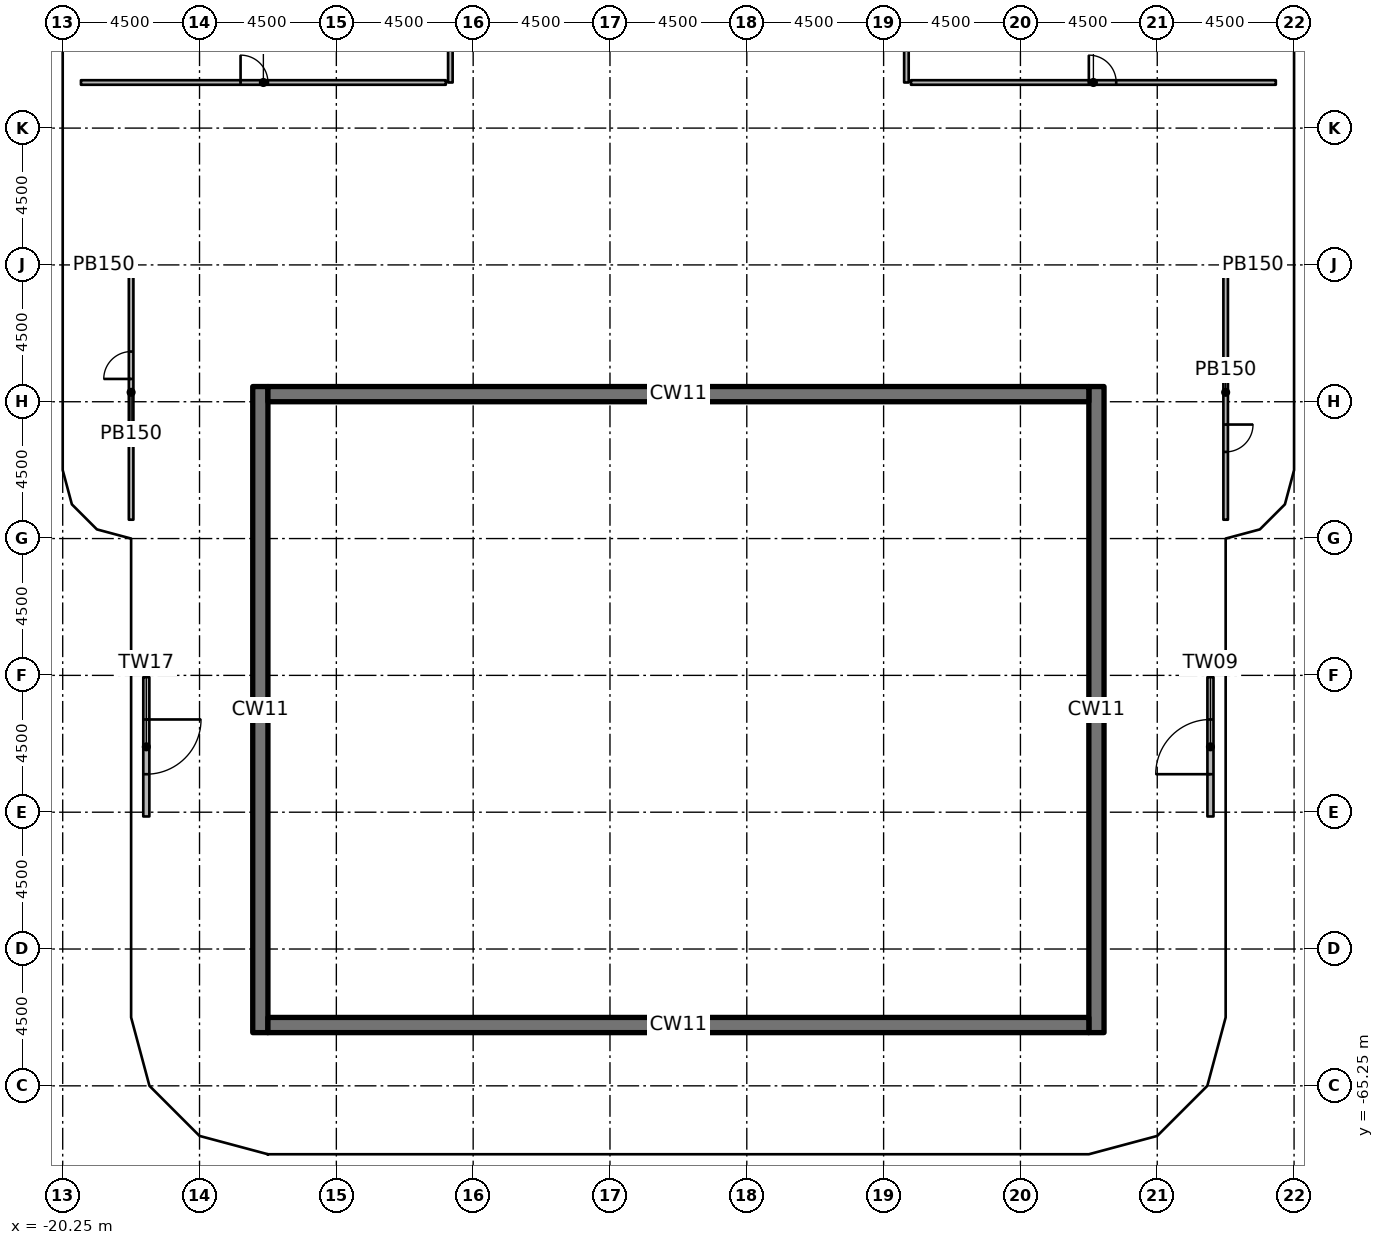
"""IFC4 building model, lengths in metres.
Left out: names, types, materials, properties, quantities, classifications, styles, units other than length and angle.
Written with IfcOpenShell. Run it as: python <this file> out.ifc"""

import sys

from ifc_helpers import new_model, si_unit, direction, frame, frame_2d, origin, origin_2d, place, context, subcontext, project, spatial, rectangle, extrude, element, fill, save


model = new_model("IFC4")
c1 = context("Model", 3, precision=1e-05, world=origin(), true_north=direction((0.0, 1.0)))
c2 = subcontext(c1, "Body", "Model", "MODEL_VIEW")
j1 = project(units=[si_unit("LENGTHUNIT", "METRE"), si_unit("PLANEANGLEUNIT", "RADIAN")], contexts=[c1])
p1 = place(None, origin())
s1 = spatial("IfcSite", under=j1, at=p1, CompositionType="ELEMENT")
p2 = place(p1, origin())
s2 = spatial("IfcBuilding", under=s1, at=p2, CompositionType="ELEMENT")
p3 = place(p2, frame((0.0, 0.0, 12.0)))
s3 = spatial("IfcBuildingStorey", under=s2, at=p3, CompositionType="ELEMENT", Elevation=12.0)
for number, where, z_axis, x_axis in (
    (1, (-19.65, -42.75, 0.0), (0.0, 0.0, 1.0), (1.0, 0.0, 0.0)),
    (2, (-15.75, -60.75, 0.0), (0.0, 0.0, 1.0), (1.0, 0.0, 0.0)),
    (3, (-15.75, -56.25, 0.0), (0.0, 0.0, 1.0), (1.0, 0.0, 0.0)),
    (4, (-15.75, -51.75, 0.0), (0.0, 0.0, 1.0), (1.0, 0.0, 0.0)),
    (5, (-15.75, -47.25, 0.0), (0.0, 0.0, 1.0), (1.0, 0.0, 0.0)),
    (6, (-15.75, -42.75, 0.0), (0.0, 0.0, 1.0), (1.0, 0.0, 0.0)),
    (7, (-15.367, -39.68, 0.0), (0.0, 0.0, 1.0), (1.0, 0.0, 0.0)),
    (8, (-15.15, -33.75, 0.0), (0.0, 0.0, 1.0), (1.0, 0.0, 0.0)),
    (9, (-11.25, -65.25, 0.0), (0.0, 0.0, 1.0), (1.0, 0.0, 0.0)),
    (10, (-10.65, -38.85, 0.0), (0.0, 0.0, 1.0), (1.0, 0.0, 0.0)),
    (11, (-6.75, -65.25, 0.0), (0.0, 0.0, 1.0), (1.0, 0.0, 0.0)),
    (12, (-2.25, -65.25, 0.0), (0.0, 0.0, 1.0), (1.0, 0.0, 0.0)),
    (13, (-2.25, -33.11, 0.0), (0.0, 0.0, 1.0), (1.0, 0.0, 0.0)),
    (14, (2.25, -65.25, 0.0), (0.0, 0.0, 1.0), (1.0, 0.0, 0.0)),
    (15, (2.25, -33.11, 0.0), (0.0, 0.0, 1.0), (1.0, 0.0, 0.0)),
    (16, (6.75, -65.25, 0.0), (0.0, 0.0, 1.0), (1.0, 0.0, 0.0)),
    (17, (11.25, -65.25, 0.0), (0.0, 0.0, 1.0), (1.0, 0.0, 0.0)),
    (18, (10.65, -38.85, 0.0), (0.0, 0.0, 1.0), (1.0, 0.0, 0.0)),
    (19, (10.65, -33.75, 0.0), (0.0, 0.0, 1.0), (1.0, 0.0, 0.0)),
    (20, (15.75, -60.75, 0.0), (0.0, 0.0, 1.0), (1.0, 0.0, 0.0)),
    (21, (15.75, -56.25, 0.0), (0.0, 0.0, 1.0), (1.0, 0.0, 0.0)),
    (22, (15.75, -51.75, 0.0), (0.0, 0.0, 1.0), (1.0, 0.0, 0.0)),
    (23, (15.75, -47.25, 0.0), (0.0, 0.0, 1.0), (1.0, 0.0, 0.0)),
    (24, (15.75, -42.75, 0.0), (0.0, 0.0, 1.0), (1.0, 0.0, 0.0)),
    (25, (15.367, -39.68, 0.0), (0.0, 0.0, 1.0), (1.0, 0.0, 0.0)),
    (26, (19.65, -42.75, 0.0), (0.0, 0.0, 1.0), (1.0, 0.0, 0.0)),
):
    element("IfcColumn", number, at=place(p3, frame(where, z_axis=z_axis, x_axis=x_axis)), inside=s3, PredefinedType="COLUMN", context=c2, shape_type="SweptSolid", body=[
        extrude(rectangle(XDim=1.2, YDim=1.2, at=origin_2d()), origin(), (0.0, 0.0, 1.0), 4.55),
    ])
for number, where, z_axis, x_axis in (
    (27, (-13.75, -63.5, 0.0), (0.0, 0.0, 1.0), (0.0, 1.0, 0.0)),
    (28, (13.75, -63.5, 0.0), (0.0, 0.0, 1.0), (0.0, 1.0, 0.0)),
):
    element("IfcWall", number, at=place(p3, frame(where, z_axis=z_axis, x_axis=x_axis)), inside=s3, PredefinedType="SOLIDWALL", context=c2, shape_type="SweptSolid", body=[
        extrude(rectangle(XDim=21.25, YDim=0.5, at=frame_2d((10.625, 0.0))), origin(), (0.0, 0.0, 1.0), 5.0),
    ])
for number, where, z_axis, x_axis in (
    (29, (-13.5, -63.25, 0.0), (0.0, 0.0, 1.0), (1.0, 0.0, 0.0)),
    (30, (-13.5, -42.5, 0.0), (0.0, 0.0, 1.0), (1.0, 0.0, 0.0)),
):
    element("IfcWall", number, at=place(p3, frame(where, z_axis=z_axis, x_axis=x_axis)), inside=s3, PredefinedType="SOLIDWALL", context=c2, shape_type="SweptSolid", body=[
        extrude(rectangle(XDim=27.0, YDim=0.5, at=frame_2d((13.5, 0.0))), origin(), (0.0, 0.0, 1.0), 5.0),
    ])
p4 = place(p3, frame((17.5, -56.39, 0.0), z_axis=(0.0, 0.0, 1.0), x_axis=(0.0, 1.0, 0.0)))
e31 = element("IfcWall", 31, at=p4, inside=s3, PredefinedType="SOLIDWALL", context=c2, shape_type="SweptSolid", body=[
    extrude(rectangle(XDim=4.58, YDim=0.2, at=frame_2d((2.29, 0.0))), origin(), (0.0, 0.0, 1.0), 4.55),
])
p5 = place(p4, frame((1.39, 0.0, 0.0)))
e32 = element("IfcOpeningElement", 32, at=p5, cuts=e31, PredefinedType="OPENING", context=c2, shape_type="SweptSolid", body=[
    extrude(rectangle(XDim=1.8, YDim=2.4, at=frame_2d((0.9, 1.2))), frame((0.0, 0.11, 0.0), z_axis=(0.0, -1.0, 0.0), x_axis=(1.0, 0.0, 0.0)), (0.0, 0.0, 1.0), 0.22),
])
p6 = place(p3, frame((-17.5, -51.81, 0.0), z_axis=(0.0, 0.0, 1.0), x_axis=(0.0, -1.0, 0.0)))
e33 = element("IfcWall", 33, at=p6, inside=s3, PredefinedType="SOLIDWALL", context=c2, shape_type="SweptSolid", body=[
    extrude(rectangle(XDim=4.58, YDim=0.2, at=frame_2d((2.29, 0.0))), origin(), (0.0, 0.0, 1.0), 4.55),
])
p7 = place(p6, frame((1.39, 0.0, 0.0)))
e34 = element("IfcOpeningElement", 34, at=p7, cuts=e33, PredefinedType="OPENING", context=c2, shape_type="SweptSolid", body=[
    extrude(rectangle(XDim=1.8, YDim=2.4, at=frame_2d((0.9, 1.2))), frame((0.0, 0.11, 0.0), z_axis=(0.0, -1.0, 0.0), x_axis=(1.0, 0.0, 0.0)), (0.0, 0.0, 1.0), 0.22),
])
p8 = place(p3, frame((-18.0, -46.63, 0.0), z_axis=(0.0, 0.0, 1.0), x_axis=(0.0, 1.0, 0.0)))
e35 = element("IfcWall", 35, at=p8, inside=s3, PredefinedType="PARTITIONING", context=c2, shape_type="SweptSolid", body=[
    extrude(rectangle(XDim=8.38, YDim=0.15, at=frame_2d((4.19, 0.0))), origin(), (0.0, 0.0, 1.0), 4.55),
])
p9 = place(p8, frame((4.63, 0.0, 0.0)))
e36 = element("IfcOpeningElement", 36, at=p9, cuts=e35, PredefinedType="OPENING", context=c2, shape_type="SweptSolid", body=[
    extrude(rectangle(XDim=0.9, YDim=2.1, at=frame_2d((0.45, 1.05))), frame((0.0, 0.085, 0.0), z_axis=(0.0, -1.0, 0.0), x_axis=(1.0, 0.0, 0.0)), (0.0, 0.0, 1.0), 0.17),
])
p10 = place(p3, frame((18.0, -38.25, 0.0), z_axis=(0.0, 0.0, 1.0), x_axis=(0.0, -1.0, 0.0)))
e37 = element("IfcWall", 37, at=p10, inside=s3, PredefinedType="PARTITIONING", context=c2, shape_type="SweptSolid", body=[
    extrude(rectangle(XDim=8.38, YDim=0.15, at=frame_2d((4.19, 0.0))), origin(), (0.0, 0.0, 1.0), 4.55),
])
p11 = place(p10, frame((5.25, 0.0, 0.0)))
e38 = element("IfcOpeningElement", 38, at=p11, cuts=e37, PredefinedType="OPENING", context=c2, shape_type="SweptSolid", body=[
    extrude(rectangle(XDim=0.9, YDim=2.1, at=frame_2d((0.45, 1.05))), frame((0.0, 0.085, 0.0), z_axis=(0.0, -1.0, 0.0), x_axis=(1.0, 0.0, 0.0)), (0.0, 0.0, 1.0), 0.17),
])
for number, where, z_axis, x_axis in (
    (39, (-19.65, -38.25, 0.0), (0.0, 0.0, 1.0), (1.0, 0.0, 0.0)),
    (40, (18.15, -38.25, 0.0), (0.0, 0.0, 1.0), (1.0, 0.0, 0.0)),
):
    element("IfcWall", number, at=place(p3, frame(where, z_axis=z_axis, x_axis=x_axis)), inside=s3, PredefinedType="PARTITIONING", context=c2, shape_type="SweptSolid", body=[
        extrude(rectangle(XDim=1.5, YDim=0.15, at=frame_2d((0.75, 0.0))), origin(), (0.0, 0.0, 1.0), 4.55),
    ])
for number, where, z_axis, x_axis in (
    (41, (7.5, -24.75, 0.0), (0.0, 0.0, 1.0), (0.0, -1.0, 0.0)),
    (42, (-7.5, -32.25, 0.0), (0.0, 0.0, 1.0), (0.0, 1.0, 0.0)),
):
    element("IfcWall", number, at=place(p3, frame(where, z_axis=z_axis, x_axis=x_axis)), inside=s3, PredefinedType="PARTITIONING", context=c2, shape_type="SweptSolid", body=[
        extrude(rectangle(XDim=7.5, YDim=0.15, at=frame_2d((3.75, 0.0))), origin(), (0.0, 0.0, 1.0), 4.55),
    ])
p12 = place(p3, frame((7.65, -32.25, 0.0), z_axis=(0.0, 0.0, 1.0), x_axis=(1.0, 0.0, 0.0)))
e43 = element("IfcWall", 43, at=p12, inside=s3, PredefinedType="PARTITIONING", context=c2, shape_type="SweptSolid", body=[
    extrude(rectangle(XDim=12.0, YDim=0.15, at=frame_2d((6.0, 0.0))), origin(), (0.0, 0.0, 1.0), 4.55),
])
p13 = place(p12, frame((5.85, 0.0, 0.0)))
e44 = element("IfcOpeningElement", 44, at=p13, cuts=e43, PredefinedType="OPENING", context=c2, shape_type="SweptSolid", body=[
    extrude(rectangle(XDim=0.9, YDim=2.1, at=frame_2d((0.45, 1.05))), frame((0.0, 0.085, 0.0), z_axis=(0.0, -1.0, 0.0), x_axis=(1.0, 0.0, 0.0)), (0.0, 0.0, 1.0), 0.17),
])
p14 = place(p3, frame((-19.65, -32.25, 0.0), z_axis=(0.0, 0.0, 1.0), x_axis=(1.0, 0.0, 0.0)))
e45 = element("IfcWall", 45, at=p14, inside=s3, PredefinedType="PARTITIONING", context=c2, shape_type="SweptSolid", body=[
    extrude(rectangle(XDim=12.0, YDim=0.15, at=frame_2d((6.0, 0.0))), origin(), (0.0, 0.0, 1.0), 4.55),
])
p15 = place(p14, frame((5.25, 0.0, 0.0)))
e46 = element("IfcOpeningElement", 46, at=p15, cuts=e45, PredefinedType="OPENING", context=c2, shape_type="SweptSolid", body=[
    extrude(rectangle(XDim=0.9, YDim=2.1, at=frame_2d((0.45, 1.05))), frame((0.0, 0.085, 0.0), z_axis=(0.0, -1.0, 0.0), x_axis=(1.0, 0.0, 0.0)), (0.0, 0.0, 1.0), 0.17),
])
p16 = place(p5, origin())
e47 = element("IfcDoor", 47, at=p16, inside=s3, OperationType="SINGLE_SWING_LEFT", PredefinedType="DOOR", context=c2, shape_type="SweptSolid", body=[
    extrude(rectangle(XDim=1.8, YDim=2.4, at=frame_2d((0.9, 1.2))), frame((0.0, 0.025, 0.0), z_axis=(0.0, -1.0, 0.0), x_axis=(1.0, 0.0, 0.0)), (0.0, 0.0, 1.0), 0.05),
])
fill(e32, e47)
p17 = place(p7, origin())
e48 = element("IfcDoor", 48, at=p17, inside=s3, OperationType="SINGLE_SWING_LEFT", PredefinedType="DOOR", context=c2, shape_type="SweptSolid", body=[
    extrude(rectangle(XDim=1.8, YDim=2.4, at=frame_2d((0.9, 1.2))), frame((0.0, 0.025, 0.0), z_axis=(0.0, -1.0, 0.0), x_axis=(1.0, 0.0, 0.0)), (0.0, 0.0, 1.0), 0.05),
])
fill(e34, e48)
p18 = place(p9, origin())
e49 = element("IfcDoor", 49, at=p18, inside=s3, OperationType="SINGLE_SWING_LEFT", PredefinedType="DOOR", context=c2, shape_type="SweptSolid", body=[
    extrude(rectangle(XDim=0.9, YDim=2.1, at=frame_2d((0.45, 1.05))), frame((0.0, 0.025, 0.0), z_axis=(0.0, -1.0, 0.0), x_axis=(1.0, 0.0, 0.0)), (0.0, 0.0, 1.0), 0.05),
])
fill(e36, e49)
p19 = place(p11, origin())
e50 = element("IfcDoor", 50, at=p19, inside=s3, OperationType="SINGLE_SWING_LEFT", PredefinedType="DOOR", context=c2, shape_type="SweptSolid", body=[
    extrude(rectangle(XDim=0.9, YDim=2.1, at=frame_2d((0.45, 1.05))), frame((0.0, 0.025, 0.0), z_axis=(0.0, -1.0, 0.0), x_axis=(1.0, 0.0, 0.0)), (0.0, 0.0, 1.0), 0.05),
])
fill(e38, e50)
p20 = place(p13, origin())
e51 = element("IfcDoor", 51, at=p20, inside=s3, OperationType="SINGLE_SWING_LEFT", PredefinedType="DOOR", context=c2, shape_type="SweptSolid", body=[
    extrude(rectangle(XDim=0.9, YDim=2.1, at=frame_2d((0.45, 1.05))), frame((0.0, 0.025, 0.0), z_axis=(0.0, -1.0, 0.0), x_axis=(1.0, 0.0, 0.0)), (0.0, 0.0, 1.0), 0.05),
])
fill(e44, e51)
p21 = place(p15, origin())
e52 = element("IfcDoor", 52, at=p21, inside=s3, OperationType="SINGLE_SWING_LEFT", PredefinedType="DOOR", context=c2, shape_type="SweptSolid", body=[
    extrude(rectangle(XDim=0.9, YDim=2.1, at=frame_2d((0.45, 1.05))), frame((0.0, 0.025, 0.0), z_axis=(0.0, -1.0, 0.0), x_axis=(1.0, 0.0, 0.0)), (0.0, 0.0, 1.0), 0.05),
])
fill(e46, e52)
save(model, sys.argv[1])
